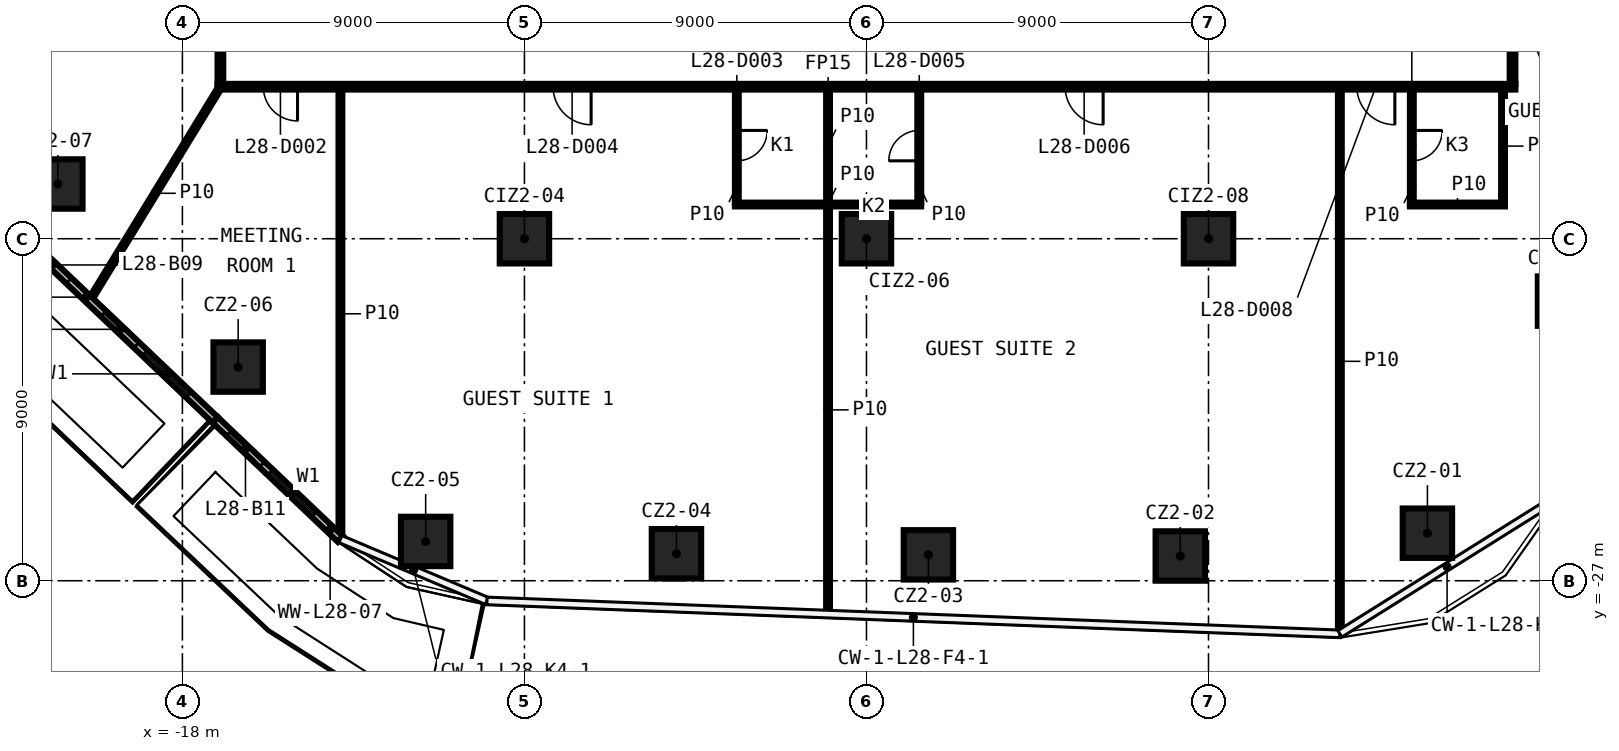
"""IFC4 building model, lengths in metres.
Left out: names, types, materials, properties, quantities, classifications, styles, units other than length and angle.
Written with IfcOpenShell. Run it as: python <this file> out.ifc"""

import sys

from ifc_helpers import new_model, si_unit, direction, frame, frame_2d, origin, origin_2d, place, context, subcontext, project, spatial, rectangle, extrude, element, fill, save


model = new_model("IFC4")
c1 = context("Model", 3, precision=1e-05, world=origin(), true_north=direction((0.0, 1.0)))
c2 = subcontext(c1, "Body", "Model", "MODEL_VIEW")
j1 = project(units=[si_unit("LENGTHUNIT", "METRE"), si_unit("PLANEANGLEUNIT", "RADIAN")], contexts=[c1])
p1 = place(None, origin())
s1 = spatial("IfcSite", under=j1, at=p1, CompositionType="ELEMENT")
p2 = place(p1, origin())
s2 = spatial("IfcBuilding", under=s1, at=p2, CompositionType="ELEMENT")
p3 = place(p2, frame((0.0, 0.0, 128.5)))
s3 = spatial("IfcBuildingStorey", under=s2, at=p3, CompositionType="ELEMENT", Elevation=128.5)
for number, where, z_axis, x_axis in (
    (1, (14.76, -25.749, 0.0), (0.0, 0.0, 1.0), (1.0, 0.0, 0.0)),
    (2, (8.258, -26.349, 0.0), (0.0, 0.0, 1.0), (1.0, 0.0, 0.0)),
    (3, (1.629, -26.319, 0.0), (0.0, 0.0, 1.0), (1.0, 0.0, 0.0)),
    (4, (-5.0, -26.29, 0.0), (0.0, 0.0, 1.0), (1.0, 0.0, 0.0)),
    (5, (-11.599, -25.966, 0.0), (0.0, 0.0, 1.0), (1.0, 0.0, 0.0)),
    (6, (-16.533, -21.377, 0.0), (0.0, 0.0, 1.0), (1.0, 0.0, 0.0)),
    (7, (-21.277, -16.56, 0.0), (0.0, 0.0, 1.0), (1.0, 0.0, 0.0)),
    (8, (18.315, -19.642, 0.0), (0.0, 0.0, 1.0), (1.0, 0.0, 0.0)),
    (9, (-9.0, -18.0, 0.0), (0.0, 0.0, 1.0), (1.0, 0.0, 0.0)),
    (10, (0.0, -18.0, 0.0), (0.0, 0.0, 1.0), (1.0, 0.0, 0.0)),
    (11, (9.0, -18.0, 0.0), (0.0, 0.0, 1.0), (1.0, 0.0, 0.0)),
):
    element("IfcColumn", number, at=place(p3, frame(where, z_axis=z_axis, x_axis=x_axis)), inside=s3, PredefinedType="COLUMN", context=c2, shape_type="SweptSolid", body=[
        extrude(rectangle(XDim=1.3, YDim=1.3, at=origin_2d()), origin(), (0.0, 0.0, 1.0), 3.3),
    ])
p4 = place(p3, frame((-3.461, -17.1, 0.0), z_axis=(0.0, 0.0, 1.0), x_axis=(1.0, 0.0, 0.0)))
e12 = element("IfcWall", 12, at=p4, inside=s3, PredefinedType="PARTITIONING", context=c2, shape_type="SweptSolid", body=[
    extrude(rectangle(XDim=4.9, YDim=0.1, at=frame_2d((2.45, 0.0))), origin(), (0.0, 0.0, 1.0), 3.3),
])
p5 = place(p3, frame((14.3, -17.1, 0.0), z_axis=(0.0, 0.0, 1.0), x_axis=(1.0, 0.0, 0.0)))
e13 = element("IfcWall", 13, at=p5, inside=s3, PredefinedType="PARTITIONING", context=c2, shape_type="SweptSolid", body=[
    extrude(rectangle(XDim=2.5, YDim=0.1, at=frame_2d((1.25, 0.0))), origin(), (0.0, 0.0, 1.0), 3.3),
])
p6 = place(p3, frame((17.075, -14.0, 0.0), z_axis=(0.0, 0.0, 1.0), x_axis=(-1.0, 0.0, 0.0)))
e14 = element("IfcWall", 14, at=p6, inside=s3, PredefinedType="PARTITIONING", context=c2, shape_type="SweptSolid", body=[
    extrude(rectangle(XDim=34.15, YDim=0.15, at=frame_2d((17.075, 0.0))), origin(), (0.0, 0.0, 1.0), 3.3),
])
p7 = place(p6, frame((32.046, 0.0, 0.0)))
e15 = element("IfcOpeningElement", 15, at=p7, cuts=e14, PredefinedType="OPENING", context=c2, shape_type="SweptSolid", body=[
    extrude(rectangle(XDim=0.9, YDim=2.1, at=frame_2d((0.45, 1.05))), frame((0.0, 0.085, 0.0), z_axis=(0.0, -1.0, 0.0), x_axis=(1.0, 0.0, 0.0)), (0.0, 0.0, 1.0), 0.17),
])
p8 = place(p6, frame((24.32, 0.0, 0.0)))
e16 = element("IfcOpeningElement", 16, at=p8, cuts=e14, PredefinedType="OPENING", context=c2, shape_type="SweptSolid", body=[
    extrude(rectangle(XDim=1.0, YDim=2.1, at=frame_2d((0.5, 1.05))), frame((0.0, 0.085, 0.0), z_axis=(0.0, -1.0, 0.0), x_axis=(1.0, 0.0, 0.0)), (0.0, 0.0, 1.0), 0.17),
])
p9 = place(p6, frame((10.847, 0.0, 0.0)))
e17 = element("IfcOpeningElement", 17, at=p9, cuts=e14, PredefinedType="OPENING", context=c2, shape_type="SweptSolid", body=[
    extrude(rectangle(XDim=1.0, YDim=2.1, at=frame_2d((0.5, 1.05))), frame((0.0, 0.085, 0.0), z_axis=(0.0, -1.0, 0.0), x_axis=(1.0, 0.0, 0.0)), (0.0, 0.0, 1.0), 0.17),
])
p10 = place(p6, frame((3.172, 0.0, 0.0)))
e18 = element("IfcOpeningElement", 18, at=p10, cuts=e14, PredefinedType="OPENING", context=c2, shape_type="SweptSolid", body=[
    extrude(rectangle(XDim=1.0, YDim=2.1, at=frame_2d((0.5, 1.05))), frame((0.0, 0.085, 0.0), z_axis=(0.0, -1.0, 0.0), x_axis=(1.0, 0.0, 0.0)), (0.0, 0.0, 1.0), 0.17),
])
p11 = place(p3, frame((-20.429, -19.608, 0.0), z_axis=(0.0, 0.0, 1.0), x_axis=(0.521610739124, 0.853183589171, 0.0)))
e19 = element("IfcWall", 19, at=p11, inside=s3, PredefinedType="PARTITIONING", context=c2, shape_type="SweptSolid", body=[
    extrude(rectangle(XDim=6.574, YDim=0.1, at=frame_2d((3.287, 0.0))), origin(), (0.0, 0.0, 1.0), 3.3),
])
p12 = place(p3, frame((17.0, 13.925, 0.0), z_axis=(0.0, 0.0, 1.0), x_axis=(0.0, -1.0, 0.0)))
e20 = element("IfcWall", 20, at=p12, inside=s3, PredefinedType="PARTITIONING", context=c2, shape_type="SweptSolid", body=[
    extrude(rectangle(XDim=27.85, YDim=0.15, at=frame_2d((13.925, 0.0))), origin(), (0.0, 0.0, 1.0), 3.3),
])
p13 = place(p12, frame((24.983, 0.0, 0.0)))
e21 = element("IfcOpeningElement", 21, at=p13, cuts=e20, PredefinedType="OPENING", context=c2, shape_type="SweptSolid", body=[
    extrude(rectangle(XDim=0.9, YDim=2.1, at=frame_2d((0.45, 1.05))), frame((0.0, 0.085, 0.0), z_axis=(0.0, -1.0, 0.0), x_axis=(1.0, 0.0, 0.0)), (0.0, 0.0, 1.0), 0.17),
])
p14 = place(p12, frame((20.143, 0.0, 0.0)))
e22 = element("IfcOpeningElement", 22, at=p14, cuts=e20, PredefinedType="OPENING", context=c2, shape_type="SweptSolid", body=[
    extrude(rectangle(XDim=0.9, YDim=2.1, at=frame_2d((0.45, 1.05))), frame((0.0, 0.085, 0.0), z_axis=(0.0, -1.0, 0.0), x_axis=(1.0, 0.0, 0.0)), (0.0, 0.0, 1.0), 0.17),
])
p15 = place(p12, frame((11.054, 0.0, 0.0)))
e23 = element("IfcOpeningElement", 23, at=p15, cuts=e20, PredefinedType="OPENING", context=c2, shape_type="SweptSolid", body=[
    extrude(rectangle(XDim=1.0, YDim=2.1, at=frame_2d((0.5, 1.05))), frame((0.0, 0.085, 0.0), z_axis=(0.0, -1.0, 0.0), x_axis=(1.0, 0.0, 0.0)), (0.0, 0.0, 1.0), 0.17),
])
p16 = place(p12, frame((7.139, 0.0, 0.0)))
e24 = element("IfcOpeningElement", 24, at=p16, cuts=e20, PredefinedType="OPENING", context=c2, shape_type="SweptSolid", body=[
    extrude(rectangle(XDim=0.9, YDim=2.1, at=frame_2d((0.45, 1.05))), frame((0.0, 0.085, 0.0), z_axis=(0.0, -1.0, 0.0), x_axis=(1.0, 0.0, 0.0)), (0.0, 0.0, 1.0), 0.17),
])
p17 = place(p3, frame((16.75, -17.05, 0.0), z_axis=(0.0, 0.0, 1.0), x_axis=(0.0, 1.0, 0.0)))
e25 = element("IfcWall", 25, at=p17, inside=s3, PredefinedType="PARTITIONING", context=c2, shape_type="SweptSolid", body=[
    extrude(rectangle(XDim=2.975, YDim=0.1, at=frame_2d((1.488, 0.0))), origin(), (0.0, 0.0, 1.0), 3.3),
])
p18 = place(p3, frame((14.35, -14.075, 0.0), z_axis=(0.0, 0.0, 1.0), x_axis=(0.0, -1.0, 0.0)))
e26 = element("IfcWall", 26, at=p18, inside=s3, PredefinedType="PARTITIONING", context=c2, shape_type="SweptSolid", body=[
    extrude(rectangle(XDim=3.025, YDim=0.1, at=frame_2d((1.513, 0.0))), origin(), (0.0, 0.0, 1.0), 3.3),
])
p19 = place(p18, frame((1.075, 0.0, 0.0)))
e27 = element("IfcOpeningElement", 27, at=p19, cuts=e26, PredefinedType="OPENING", context=c2, shape_type="SweptSolid", body=[
    extrude(rectangle(XDim=0.8, YDim=2.1, at=frame_2d((0.4, 1.05))), frame((0.0, 0.06, 0.0), z_axis=(0.0, -1.0, 0.0), x_axis=(1.0, 0.0, 0.0)), (0.0, 0.0, 1.0), 0.12),
])
p20 = place(p3, frame((12.456, -28.378, 0.0), z_axis=(0.0, 0.0, 1.0), x_axis=(0.0, 1.0, 0.0)))
e28 = element("IfcWall", 28, at=p20, inside=s3, PredefinedType="PARTITIONING", context=c2, shape_type="SweptSolid", body=[
    extrude(rectangle(XDim=14.303, YDim=0.1, at=frame_2d((7.151, 0.0))), origin(), (0.0, 0.0, 1.0), 3.3),
])
p21 = place(p3, frame((1.389, -17.05, 0.0), z_axis=(0.0, 0.0, 1.0), x_axis=(0.0, 1.0, 0.0)))
e29 = element("IfcWall", 29, at=p21, inside=s3, PredefinedType="PARTITIONING", context=c2, shape_type="SweptSolid", body=[
    extrude(rectangle(XDim=2.975, YDim=0.1, at=frame_2d((1.488, 0.0))), origin(), (0.0, 0.0, 1.0), 3.3),
])
p22 = place(p21, frame((1.1, 0.0, 0.0)))
e30 = element("IfcOpeningElement", 30, at=p22, cuts=e29, PredefinedType="OPENING", context=c2, shape_type="SweptSolid", body=[
    extrude(rectangle(XDim=0.8, YDim=2.1, at=frame_2d((0.4, 1.05))), frame((0.0, 0.06, 0.0), z_axis=(0.0, -1.0, 0.0), x_axis=(1.0, 0.0, 0.0)), (0.0, 0.0, 1.0), 0.12),
])
p23 = place(p3, frame((-1.011, -27.858, 0.0), z_axis=(0.0, 0.0, 1.0), x_axis=(0.0, 1.0, 0.0)))
e31 = element("IfcWall", 31, at=p23, inside=s3, PredefinedType="PARTITIONING", context=c2, shape_type="SweptSolid", body=[
    extrude(rectangle(XDim=10.708, YDim=0.1, at=frame_2d((5.354, 0.0))), origin(), (0.0, 0.0, 1.0), 3.3),
])
p24 = place(p3, frame((-1.011, -17.05, 0.0), z_axis=(0.0, 0.0, 1.0), x_axis=(0.0, 1.0, 0.0)))
e32 = element("IfcWall", 32, at=p24, inside=s3, PredefinedType="PARTITIONING", context=c2, shape_type="SweptSolid", body=[
    extrude(rectangle(XDim=2.975, YDim=0.1, at=frame_2d((1.488, 0.0))), origin(), (0.0, 0.0, 1.0), 3.3),
])
p25 = place(p3, frame((-3.411, -14.075, 0.0), z_axis=(0.0, 0.0, 1.0), x_axis=(0.0, -1.0, 0.0)))
e33 = element("IfcWall", 33, at=p25, inside=s3, PredefinedType="PARTITIONING", context=c2, shape_type="SweptSolid", body=[
    extrude(rectangle(XDim=2.975, YDim=0.1, at=frame_2d((1.488, 0.0))), origin(), (0.0, 0.0, 1.0), 3.3),
])
p26 = place(p25, frame((1.075, 0.0, 0.0)))
e34 = element("IfcOpeningElement", 34, at=p26, cuts=e33, PredefinedType="OPENING", context=c2, shape_type="SweptSolid", body=[
    extrude(rectangle(XDim=0.8, YDim=2.1, at=frame_2d((0.4, 1.05))), frame((0.0, 0.06, 0.0), z_axis=(0.0, -1.0, 0.0), x_axis=(1.0, 0.0, 0.0)), (0.0, 0.0, 1.0), 0.12),
])
p27 = place(p3, frame((-13.842, -25.876, 0.0), z_axis=(0.0, 0.0, 1.0), x_axis=(0.0, 1.0, 0.0)))
e35 = element("IfcWall", 35, at=p27, inside=s3, PredefinedType="PARTITIONING", context=c2, shape_type="SweptSolid", body=[
    extrude(rectangle(XDim=11.801, YDim=0.1, at=frame_2d((5.9, 0.0))), origin(), (0.0, 0.0, 1.0), 3.3),
])
p28 = place(p3, frame((-17.0, -13.925, 0.0), z_axis=(0.0, 0.0, 1.0), x_axis=(0.0, 1.0, 0.0)))
e36 = element("IfcWall", 36, at=p28, inside=s3, PredefinedType="PARTITIONING", context=c2, shape_type="SweptSolid", body=[
    extrude(rectangle(XDim=27.85, YDim=0.15, at=frame_2d((13.925, 0.0))), origin(), (0.0, 0.0, 1.0), 3.3),
])
p29 = place(p28, frame((11.107, 0.0, 0.0)))
e37 = element("IfcOpeningElement", 37, at=p29, cuts=e36, PredefinedType="OPENING", context=c2, shape_type="SweptSolid", body=[
    extrude(rectangle(XDim=0.9, YDim=2.1, at=frame_2d((0.45, 1.05))), frame((0.0, 0.085, 0.0), z_axis=(0.0, -1.0, 0.0), x_axis=(1.0, 0.0, 0.0)), (0.0, 0.0, 1.0), 0.17),
])
p30 = place(p28, frame((25.204, 0.0, 0.0)))
e38 = element("IfcOpeningElement", 38, at=p30, cuts=e36, PredefinedType="OPENING", context=c2, shape_type="SweptSolid", body=[
    extrude(rectangle(XDim=0.9, YDim=2.1, at=frame_2d((0.45, 1.05))), frame((0.0, 0.085, 0.0), z_axis=(0.0, -1.0, 0.0), x_axis=(1.0, 0.0, 0.0)), (0.0, 0.0, 1.0), 0.17),
])
p31 = place(p28, frame((18.833, 0.0, 0.0)))
e39 = element("IfcOpeningElement", 39, at=p31, cuts=e36, PredefinedType="OPENING", context=c2, shape_type="SweptSolid", body=[
    extrude(rectangle(XDim=1.0, YDim=2.1, at=frame_2d((0.5, 1.05))), frame((0.0, 0.085, 0.0), z_axis=(0.0, -1.0, 0.0), x_axis=(1.0, 0.0, 0.0)), (0.0, 0.0, 1.0), 0.17),
])
p32 = place(p28, frame((17.31, 0.0, 0.0)))
e40 = element("IfcOpeningElement", 40, at=p32, cuts=e36, PredefinedType="OPENING", context=c2, shape_type="SweptSolid", body=[
    extrude(rectangle(XDim=1.0, YDim=2.1, at=frame_2d((0.5, 1.05))), frame((0.0, 0.085, 0.0), z_axis=(0.0, -1.0, 0.0), x_axis=(1.0, 0.0, 0.0)), (0.0, 0.0, 1.0), 0.17),
])
p33 = place(p3, frame((-23.741, -16.484, 0.0), z_axis=(0.0, 0.0, 1.0), x_axis=(0.724483683082, -0.689291950445, 0.0)))
e41 = element("IfcWall", 41, at=p33, inside=s3, PredefinedType="SOLIDWALL", context=c2, shape_type="SweptSolid", body=[
    extrude(rectangle(XDim=9.116, YDim=0.2, at=frame_2d((4.558, 0.0))), origin(), (0.0, 0.0, 1.0), 3.3),
])
p34 = place(p33, frame((0.5, 0.0, 0.6)))
e42 = element("IfcOpeningElement", 42, at=p34, cuts=e41, PredefinedType="OPENING", context=c2, shape_type="SweptSolid", body=[
    extrude(rectangle(XDim=1.6, YDim=2.4, at=frame_2d((0.8, 1.2))), frame((0.0, 0.11, 0.0), z_axis=(0.0, -1.0, 0.0), x_axis=(1.0, 0.0, 0.0)), (0.0, 0.0, 1.0), 0.22),
])
p35 = place(p33, frame((2.6, 0.0, 0.0)))
e43 = element("IfcOpeningElement", 43, at=p35, cuts=e41, PredefinedType="OPENING", context=c2, shape_type="SweptSolid", body=[
    extrude(rectangle(XDim=1.2, YDim=2.4, at=frame_2d((0.6, 1.2))), frame((0.0, 0.11, 0.0), z_axis=(0.0, -1.0, 0.0), x_axis=(1.0, 0.0, 0.0)), (0.0, 0.0, 1.0), 0.22),
])
p36 = place(p33, frame((6.558, 0.0, 0.6)))
e44 = element("IfcOpeningElement", 44, at=p36, cuts=e41, PredefinedType="OPENING", context=c2, shape_type="SweptSolid", body=[
    extrude(rectangle(XDim=1.6, YDim=2.4, at=frame_2d((0.8, 1.2))), frame((0.0, 0.11, 0.0), z_axis=(0.0, -1.0, 0.0), x_axis=(1.0, 0.0, 0.0)), (0.0, 0.0, 1.0), 0.22),
])
p37 = place(p33, frame((5.058, 0.0, 0.0)))
e45 = element("IfcOpeningElement", 45, at=p37, cuts=e41, PredefinedType="OPENING", context=c2, shape_type="SweptSolid", body=[
    extrude(rectangle(XDim=1.2, YDim=2.4, at=frame_2d((0.6, 1.2))), frame((0.0, 0.11, 0.0), z_axis=(0.0, -1.0, 0.0), x_axis=(1.0, 0.0, 0.0)), (0.0, 0.0, 1.0), 0.22),
])
p38 = place(p3, frame((-17.137, -22.768, 0.0), z_axis=(0.0, 0.0, 1.0), x_axis=(0.724465880686, -0.689310661257, 0.0)))
e46 = element("IfcWall", 46, at=p38, inside=s3, PredefinedType="SOLIDWALL", context=c2, shape_type="SweptSolid", body=[
    extrude(rectangle(XDim=4.549, YDim=0.2, at=frame_2d((2.274, 0.0))), origin(), (0.0, 0.0, 1.0), 3.3),
])
p39 = place(p38, frame((2.0, 0.0, 0.6)))
e47 = element("IfcOpeningElement", 47, at=p39, cuts=e46, PredefinedType="OPENING", context=c2, shape_type="SweptSolid", body=[
    extrude(rectangle(XDim=1.6, YDim=2.4, at=frame_2d((0.8, 1.2))), frame((0.0, 0.11, 0.0), z_axis=(0.0, -1.0, 0.0), x_axis=(1.0, 0.0, 0.0)), (0.0, 0.0, 1.0), 0.22),
])
p40 = place(p38, frame((0.5, 0.0, 0.0)))
e48 = element("IfcOpeningElement", 48, at=p40, cuts=e46, PredefinedType="OPENING", context=c2, shape_type="SweptSolid", body=[
    extrude(rectangle(XDim=1.2, YDim=2.4, at=frame_2d((0.6, 1.2))), frame((0.0, 0.11, 0.0), z_axis=(0.0, -1.0, 0.0), x_axis=(1.0, 0.0, 0.0)), (0.0, 0.0, 1.0), 0.22),
])
p41 = place(p7, origin())
e49 = element("IfcDoor", 49, at=p41, inside=s3, OperationType="SINGLE_SWING_RIGHT", PredefinedType="DOOR", context=c2, shape_type="SweptSolid", body=[
    extrude(rectangle(XDim=0.9, YDim=2.1, at=frame_2d((0.45, 1.05))), frame((0.0, 0.025, 0.0), z_axis=(0.0, -1.0, 0.0), x_axis=(1.0, 0.0, 0.0)), (0.0, 0.0, 1.0), 0.05),
])
fill(e15, e49)
p42 = place(p26, origin())
e50 = element("IfcDoor", 50, at=p42, inside=s3, OperationType="SINGLE_SWING_RIGHT", PredefinedType="DOOR", context=c2, shape_type="SweptSolid", body=[
    extrude(rectangle(XDim=0.8, YDim=2.1, at=frame_2d((0.4, 1.05))), frame((0.0, 0.025, 0.0), z_axis=(0.0, -1.0, 0.0), x_axis=(1.0, 0.0, 0.0)), (0.0, 0.0, 1.0), 0.05),
])
fill(e34, e50)
p43 = place(p8, origin())
e51 = element("IfcDoor", 51, at=p43, inside=s3, OperationType="SINGLE_SWING_LEFT", PredefinedType="DOOR", context=c2, shape_type="SweptSolid", body=[
    extrude(rectangle(XDim=1.0, YDim=2.1, at=frame_2d((0.5, 1.05))), frame((0.0, 0.025, 0.0), z_axis=(0.0, -1.0, 0.0), x_axis=(1.0, 0.0, 0.0)), (0.0, 0.0, 1.0), 0.05),
])
fill(e16, e51)
p44 = place(p22, origin())
e52 = element("IfcDoor", 52, at=p44, inside=s3, OperationType="SINGLE_SWING_LEFT", PredefinedType="DOOR", context=c2, shape_type="SweptSolid", body=[
    extrude(rectangle(XDim=0.8, YDim=2.1, at=frame_2d((0.4, 1.05))), frame((0.0, 0.025, 0.0), z_axis=(0.0, -1.0, 0.0), x_axis=(1.0, 0.0, 0.0)), (0.0, 0.0, 1.0), 0.05),
])
fill(e30, e52)
p45 = place(p9, origin())
e53 = element("IfcDoor", 53, at=p45, inside=s3, OperationType="SINGLE_SWING_RIGHT", PredefinedType="DOOR", context=c2, shape_type="SweptSolid", body=[
    extrude(rectangle(XDim=1.0, YDim=2.1, at=frame_2d((0.5, 1.05))), frame((0.0, 0.025, 0.0), z_axis=(0.0, -1.0, 0.0), x_axis=(1.0, 0.0, 0.0)), (0.0, 0.0, 1.0), 0.05),
])
fill(e17, e53)
p46 = place(p19, origin())
e54 = element("IfcDoor", 54, at=p46, inside=s3, OperationType="SINGLE_SWING_RIGHT", PredefinedType="DOOR", context=c2, shape_type="SweptSolid", body=[
    extrude(rectangle(XDim=0.8, YDim=2.1, at=frame_2d((0.4, 1.05))), frame((0.0, 0.025, 0.0), z_axis=(0.0, -1.0, 0.0), x_axis=(1.0, 0.0, 0.0)), (0.0, 0.0, 1.0), 0.05),
])
fill(e27, e54)
p47 = place(p10, origin())
e55 = element("IfcDoor", 55, at=p47, inside=s3, OperationType="SINGLE_SWING_LEFT", PredefinedType="DOOR", context=c2, shape_type="SweptSolid", body=[
    extrude(rectangle(XDim=1.0, YDim=2.1, at=frame_2d((0.5, 1.05))), frame((0.0, 0.025, 0.0), z_axis=(0.0, -1.0, 0.0), x_axis=(1.0, 0.0, 0.0)), (0.0, 0.0, 1.0), 0.05),
])
fill(e18, e55)
p48 = place(p35, origin())
e56 = element("IfcDoor", 56, at=p48, inside=s3, OperationType="SLIDING_TO_LEFT", PredefinedType="DOOR", context=c2, shape_type="SweptSolid", body=[
    extrude(rectangle(XDim=1.2, YDim=2.4, at=frame_2d((0.6, 1.2))), frame((0.0, 0.025, 0.0), z_axis=(0.0, -1.0, 0.0), x_axis=(1.0, 0.0, 0.0)), (0.0, 0.0, 1.0), 0.05),
])
fill(e43, e56)
p49 = place(p36, origin())
e57 = element("IfcWindow", 57, at=p49, inside=s3, PartitioningType="SINGLE_PANEL", PredefinedType="WINDOW", context=c2, shape_type="SweptSolid", body=[
    extrude(rectangle(XDim=1.6, YDim=2.4, at=frame_2d((0.8, 1.2))), frame((0.0, 0.03, 0.0), z_axis=(0.0, -1.0, 0.0), x_axis=(1.0, 0.0, 0.0)), (0.0, 0.0, 1.0), 0.06),
])
fill(e44, e57)
p50 = place(p37, origin())
e58 = element("IfcDoor", 58, at=p50, inside=s3, OperationType="SLIDING_TO_LEFT", PredefinedType="DOOR", context=c2, shape_type="SweptSolid", body=[
    extrude(rectangle(XDim=1.2, YDim=2.4, at=frame_2d((0.6, 1.2))), frame((0.0, 0.025, 0.0), z_axis=(0.0, -1.0, 0.0), x_axis=(1.0, 0.0, 0.0)), (0.0, 0.0, 1.0), 0.05),
])
fill(e45, e58)
p51 = place(p39, origin())
e59 = element("IfcWindow", 59, at=p51, inside=s3, PartitioningType="SINGLE_PANEL", PredefinedType="WINDOW", context=c2, shape_type="SweptSolid", body=[
    extrude(rectangle(XDim=1.6, YDim=2.4, at=frame_2d((0.8, 1.2))), frame((0.0, 0.03, 0.0), z_axis=(0.0, -1.0, 0.0), x_axis=(1.0, 0.0, 0.0)), (0.0, 0.0, 1.0), 0.06),
])
fill(e47, e59)
p52 = place(p40, origin())
e60 = element("IfcDoor", 60, at=p52, inside=s3, OperationType="SLIDING_TO_LEFT", PredefinedType="DOOR", context=c2, shape_type="SweptSolid", body=[
    extrude(rectangle(XDim=1.2, YDim=2.4, at=frame_2d((0.6, 1.2))), frame((0.0, 0.025, 0.0), z_axis=(0.0, -1.0, 0.0), x_axis=(1.0, 0.0, 0.0)), (0.0, 0.0, 1.0), 0.05),
])
fill(e48, e60)
save(model, sys.argv[1])
